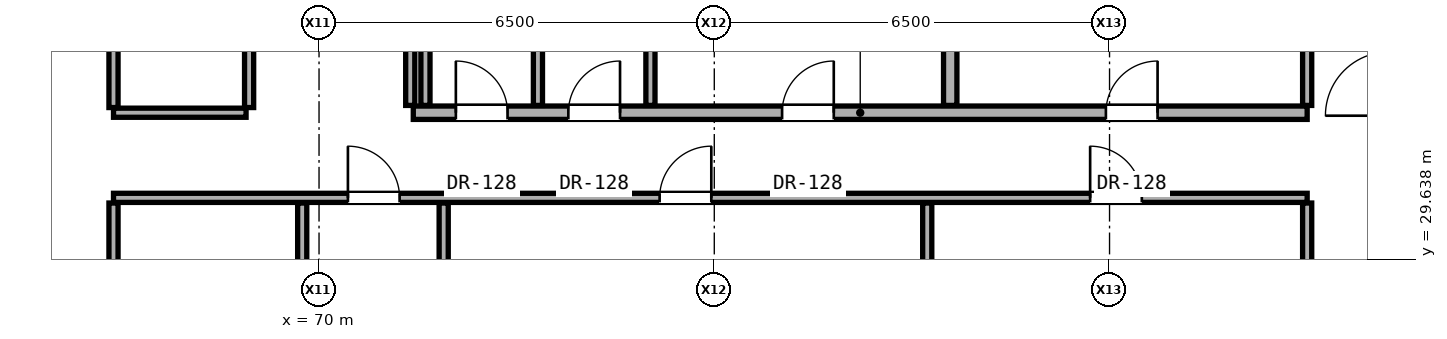
"""IFC4 building model, lengths in metres.
Left out: names, types, materials, properties, quantities, classifications, styles, units other than length and angle.
Written with IfcOpenShell. Run it as: python <this file> out.ifc"""

import sys

from ifc_helpers import new_model, si_unit, direction, frame, frame_2d, origin, place, context, subcontext, project, spatial, rectangle, extrude, element, fill, save


model = new_model("IFC4")
c1 = context("Model", 3, precision=1e-05, world=origin(), true_north=direction((0.0, 1.0)))
c2 = subcontext(c1, "Body", "Model", "MODEL_VIEW")
j1 = project(units=[si_unit("LENGTHUNIT", "METRE"), si_unit("PLANEANGLEUNIT", "RADIAN")], contexts=[c1])
p1 = place(None, origin())
s1 = spatial("IfcSite", under=j1, at=p1, CompositionType="ELEMENT")
p2 = place(p1, origin())
s2 = spatial("IfcBuilding", under=s1, at=p2, CompositionType="ELEMENT")
p3 = place(p2, frame((0.0, 0.0, 65.3)))
s3 = spatial("IfcBuildingStorey", under=s2, at=p3, CompositionType="ELEMENT", Elevation=65.3)
p4 = place(p3, frame((66.62, 30.65, 0.0), z_axis=(0.0, 0.0, 1.0), x_axis=(1.0, 0.0, 0.0)))
e1 = element("IfcWall", 1, at=p4, inside=s3, PredefinedType="PARTITIONING", context=c2, shape_type="SweptSolid", body=[
    extrude(rectangle(XDim=19.63, YDim=0.15, at=frame_2d((9.815, 0.0))), origin(), (0.0, 0.0, 1.0), 2.125),
])
p5 = place(p4, frame((3.855, 0.0, 0.0)))
e2 = element("IfcOpeningElement", 2, at=p5, cuts=e1, PredefinedType="OPENING", context=c2, shape_type="SweptSolid", body=[
    extrude(rectangle(XDim=0.85, YDim=2.01, at=frame_2d((0.425, 1.005))), frame((0.0, 0.085, 0.0), z_axis=(0.0, -1.0, 0.0), x_axis=(1.0, 0.0, 0.0)), (0.0, 0.0, 1.0), 0.17),
])
p6 = place(p4, frame((8.981, 0.0, 0.0)))
e3 = element("IfcOpeningElement", 3, at=p6, cuts=e1, PredefinedType="OPENING", context=c2, shape_type="SweptSolid", body=[
    extrude(rectangle(XDim=0.85, YDim=2.01, at=frame_2d((0.425, 1.005))), frame((0.0, 0.085, 0.0), z_axis=(0.0, -1.0, 0.0), x_axis=(1.0, 0.0, 0.0)), (0.0, 0.0, 1.0), 0.17),
])
p7 = place(p4, frame((16.061, 0.0, 0.0)))
e4 = element("IfcOpeningElement", 4, at=p7, cuts=e1, PredefinedType="OPENING", context=c2, shape_type="SweptSolid", body=[
    extrude(rectangle(XDim=0.85, YDim=2.01, at=frame_2d((0.425, 1.005))), frame((0.0, 0.085, 0.0), z_axis=(0.0, -1.0, 0.0), x_axis=(1.0, 0.0, 0.0)), (0.0, 0.0, 1.0), 0.17),
])
p8 = place(p3, frame((66.62, 32.05, 0.0), z_axis=(0.0, 0.0, 1.0), x_axis=(1.0, 0.0, 0.0)))
e5 = element("IfcWall", 5, at=p8, inside=s3, PredefinedType="PARTITIONING", context=c2, shape_type="SweptSolid", body=[
    extrude(rectangle(XDim=2.18, YDim=0.15, at=frame_2d((1.09, 0.0))), origin(), (0.0, 0.0, 1.0), 2.125),
])
p9 = place(p3, frame((71.55, 32.05, 0.0), z_axis=(0.0, 0.0, 1.0), x_axis=(1.0, 0.0, 0.0)))
e6 = element("IfcWall", 6, at=p9, inside=s3, PredefinedType="SOLIDWALL", context=c2, shape_type="SweptSolid", body=[
    extrude(rectangle(XDim=14.7, YDim=0.22, at=frame_2d((7.35, 0.0))), origin(), (0.0, 0.0, 1.0), 2.125),
])
p10 = place(p9, frame((11.39, 0.0, 0.0)))
e7 = element("IfcOpeningElement", 7, at=p10, cuts=e6, PredefinedType="OPENING", context=c2, shape_type="SweptSolid", body=[
    extrude(rectangle(XDim=0.85, YDim=2.01, at=frame_2d((0.425, 1.005))), frame((0.0, 0.12, 0.0), z_axis=(0.0, -1.0, 0.0), x_axis=(1.0, 0.0, 0.0)), (0.0, 0.0, 1.0), 0.24),
])
p11 = place(p9, frame((6.065, 0.0, 0.0)))
e8 = element("IfcOpeningElement", 8, at=p11, cuts=e6, PredefinedType="OPENING", context=c2, shape_type="SweptSolid", body=[
    extrude(rectangle(XDim=0.85, YDim=2.01, at=frame_2d((0.425, 1.005))), frame((0.0, 0.12, 0.0), z_axis=(0.0, -1.0, 0.0), x_axis=(1.0, 0.0, 0.0)), (0.0, 0.0, 1.0), 0.24),
])
p12 = place(p9, frame((0.7, 0.0, 0.0)))
e9 = element("IfcOpeningElement", 9, at=p12, cuts=e6, PredefinedType="OPENING", context=c2, shape_type="SweptSolid", body=[
    extrude(rectangle(XDim=0.85, YDim=2.01, at=frame_2d((0.425, 1.005))), frame((0.0, 0.12, 0.0), z_axis=(0.0, -1.0, 0.0), x_axis=(1.0, 0.0, 0.0)), (0.0, 0.0, 1.0), 0.24),
])
p13 = place(p9, frame((2.55, 0.0, 0.0)))
e10 = element("IfcOpeningElement", 10, at=p13, cuts=e6, PredefinedType="OPENING", context=c2, shape_type="SweptSolid", body=[
    extrude(rectangle(XDim=0.85, YDim=2.01, at=frame_2d((0.425, 1.005))), frame((0.0, 0.12, 0.0), z_axis=(0.0, -1.0, 0.0), x_axis=(1.0, 0.0, 0.0)), (0.0, 0.0, 1.0), 0.24),
])
p14 = place(p3, frame((66.62, 24.935, 0.0), z_axis=(0.0, 0.0, 1.0), x_axis=(0.0, 1.0, 0.0)))
e11 = element("IfcWall", 11, at=p14, inside=s3, PredefinedType="PARTITIONING", context=c2, shape_type="SweptSolid", body=[
    extrude(rectangle(XDim=5.63, YDim=0.15, at=frame_2d((2.815, 0.0))), origin(), (0.0, 0.0, 1.0), 2.279),
])
p15 = place(p14, frame((2.34, 0.0, 0.0)))
e12 = element("IfcOpeningElement", 12, at=p15, cuts=e11, PredefinedType="OPENING", context=c2, shape_type="SweptSolid", body=[
    extrude(rectangle(XDim=0.95, YDim=2.15, at=frame_2d((0.475, 1.075))), frame((0.0, 0.085, 0.0), z_axis=(0.0, -1.0, 0.0), x_axis=(1.0, 0.0, 0.0)), (0.0, 0.0, 1.0), 0.17),
])
p16 = place(p3, frame((66.62, 32.135, 0.0), z_axis=(0.0, 0.0, 1.0), x_axis=(0.0, 1.0, 0.0)))
e13 = element("IfcWall", 13, at=p16, inside=s3, PredefinedType="PARTITIONING", context=c2, shape_type="SweptSolid", body=[
    extrude(rectangle(XDim=3.48, YDim=0.15, at=frame_2d((1.74, 0.0))), origin(), (0.0, 0.0, 1.0), 2.452),
])
p17 = place(p3, frame((68.85, 32.135, 0.0), z_axis=(0.0, 0.0, 1.0), x_axis=(0.0, 1.0, 0.0)))
e14 = element("IfcWall", 14, at=p17, inside=s3, PredefinedType="PARTITIONING", context=c2, shape_type="SweptSolid", body=[
    extrude(rectangle(XDim=2.745, YDim=0.15, at=frame_2d((1.373, 0.0))), origin(), (0.0, 0.0, 1.0), 3.06),
])
p18 = place(p3, frame((69.723, 24.935, 0.0), z_axis=(0.0, 0.0, 1.0), x_axis=(0.0, 1.0, 0.0)))
e15 = element("IfcWall", 15, at=p18, inside=s3, PredefinedType="PARTITIONING", context=c2, shape_type="SweptSolid", body=[
    extrude(rectangle(XDim=5.63, YDim=0.15, at=frame_2d((2.815, 0.0))), origin(), (0.0, 0.0, 1.0), 2.125),
])
for number, where, z_axis, x_axis in (
    (16, (71.5, 32.17, 0.0), (0.0, 0.0, 1.0), (0.0, 1.0, 0.0)),
    (17, (71.75, 32.17, 0.0), (0.0, 0.0, 1.0), (0.0, 1.0, 0.0)),
):
    element("IfcWall", number, at=place(p3, frame(where, z_axis=z_axis, x_axis=x_axis)), inside=s3, PredefinedType="PARTITIONING", context=c2, shape_type="SweptSolid", body=[
        extrude(rectangle(XDim=2.71, YDim=0.15, at=frame_2d((1.355, 0.0))), origin(), (0.0, 0.0, 1.0), 3.06),
    ])
p19 = place(p3, frame((72.05, 26.17, 0.0), z_axis=(0.0, 0.0, 1.0), x_axis=(0.0, 1.0, 0.0)))
e18 = element("IfcWall", 18, at=p19, inside=s3, PredefinedType="PARTITIONING", context=c2, shape_type="SweptSolid", body=[
    extrude(rectangle(XDim=4.395, YDim=0.15, at=frame_2d((2.198, 0.0))), origin(), (0.0, 0.0, 1.0), 2.125),
])
for number, where, z_axis, x_axis in (
    (19, (73.6, 32.17, 0.0), (0.0, 0.0, 1.0), (0.0, 1.0, 0.0)),
    (20, (75.45, 32.17, 0.0), (0.0, 0.0, 1.0), (0.0, 1.0, 0.0)),
):
    element("IfcWall", number, at=place(p3, frame(where, z_axis=z_axis, x_axis=x_axis)), inside=s3, PredefinedType="PARTITIONING", context=c2, shape_type="SweptSolid", body=[
        extrude(rectangle(XDim=2.71, YDim=0.15, at=frame_2d((1.355, 0.0))), origin(), (0.0, 0.0, 1.0), 3.06),
    ])
p20 = place(p3, frame((80.002, 26.17, 0.0), z_axis=(0.0, 0.0, 1.0), x_axis=(0.0, 1.0, 0.0)))
e21 = element("IfcWall", 21, at=p20, inside=s3, PredefinedType="PARTITIONING", context=c2, shape_type="SweptSolid", body=[
    extrude(rectangle(XDim=4.395, YDim=0.15, at=frame_2d((2.198, 0.0))), origin(), (0.0, 0.0, 1.0), 2.125),
])
p21 = place(p3, frame((80.38, 32.17, 0.0), z_axis=(0.0, 0.0, 1.0), x_axis=(0.0, 1.0, 0.0)))
e22 = element("IfcWall", 22, at=p21, inside=s3, PredefinedType="SOLIDWALL", context=c2, shape_type="SweptSolid", body=[
    extrude(rectangle(XDim=2.71, YDim=0.22, at=frame_2d((1.355, 0.0))), origin(), (0.0, 0.0, 1.0), 3.06),
])
p22 = place(p3, frame((86.25, 26.17, 0.0), z_axis=(0.0, 0.0, 1.0), x_axis=(0.0, 1.0, 0.0)))
e23 = element("IfcWall", 23, at=p22, inside=s3, PredefinedType="PARTITIONING", context=c2, shape_type="SweptSolid", body=[
    extrude(rectangle(XDim=4.395, YDim=0.15, at=frame_2d((2.198, 0.0))), origin(), (0.0, 0.0, 1.0), 2.279),
])
p23 = place(p3, frame((86.25, 32.17, 0.0), z_axis=(0.0, 0.0, 1.0), x_axis=(0.0, 1.0, 0.0)))
e24 = element("IfcWall", 24, at=p23, inside=s3, PredefinedType="PARTITIONING", context=c2, shape_type="SweptSolid", body=[
    extrude(rectangle(XDim=2.795, YDim=0.15, at=frame_2d((1.397, 0.0))), origin(), (0.0, 0.0, 1.0), 2.452),
])
p24 = place(p10, origin())
e25 = element("IfcDoor", 25, at=p24, inside=s3, OperationType="SINGLE_SWING_RIGHT", PredefinedType="DOOR", context=c2, shape_type="SweptSolid", body=[
    extrude(rectangle(XDim=0.85, YDim=2.01, at=frame_2d((0.425, 1.005))), frame((0.0, 0.025, 0.0), z_axis=(0.0, -1.0, 0.0), x_axis=(1.0, 0.0, 0.0)), (0.0, 0.0, 1.0), 0.05),
])
fill(e7, e25)
p25 = place(p11, origin())
e26 = element("IfcDoor", 26, at=p25, inside=s3, OperationType="SINGLE_SWING_RIGHT", PredefinedType="DOOR", context=c2, shape_type="SweptSolid", body=[
    extrude(rectangle(XDim=0.85, YDim=2.01, at=frame_2d((0.425, 1.005))), frame((0.0, 0.025, 0.0), z_axis=(0.0, -1.0, 0.0), x_axis=(1.0, 0.0, 0.0)), (0.0, 0.0, 1.0), 0.05),
])
fill(e8, e26)
p26 = place(p12, origin())
e27 = element("IfcDoor", 27, at=p26, inside=s3, OperationType="SINGLE_SWING_LEFT", PredefinedType="DOOR", context=c2, shape_type="SweptSolid", body=[
    extrude(rectangle(XDim=0.85, YDim=2.01, at=frame_2d((0.425, 1.005))), frame((0.0, 0.025, 0.0), z_axis=(0.0, -1.0, 0.0), x_axis=(1.0, 0.0, 0.0)), (0.0, 0.0, 1.0), 0.05),
])
fill(e9, e27)
p27 = place(p13, origin())
e28 = element("IfcDoor", 28, at=p27, inside=s3, OperationType="SINGLE_SWING_RIGHT", PredefinedType="DOOR", context=c2, shape_type="SweptSolid", body=[
    extrude(rectangle(XDim=0.85, YDim=2.01, at=frame_2d((0.425, 1.005))), frame((0.0, 0.025, 0.0), z_axis=(0.0, -1.0, 0.0), x_axis=(1.0, 0.0, 0.0)), (0.0, 0.0, 1.0), 0.05),
])
fill(e10, e28)
p28 = place(p5, origin())
e29 = element("IfcDoor", 29, at=p28, inside=s3, OperationType="SINGLE_SWING_LEFT", PredefinedType="DOOR", context=c2, shape_type="SweptSolid", body=[
    extrude(rectangle(XDim=0.85, YDim=2.01, at=frame_2d((0.425, 1.005))), frame((0.0, 0.025, 0.0), z_axis=(0.0, -1.0, 0.0), x_axis=(1.0, 0.0, 0.0)), (0.0, 0.0, 1.0), 0.05),
])
fill(e2, e29)
p29 = place(p6, origin())
e30 = element("IfcDoor", 30, at=p29, inside=s3, OperationType="SINGLE_SWING_RIGHT", PredefinedType="DOOR", context=c2, shape_type="SweptSolid", body=[
    extrude(rectangle(XDim=0.85, YDim=2.01, at=frame_2d((0.425, 1.005))), frame((0.0, 0.025, 0.0), z_axis=(0.0, -1.0, 0.0), x_axis=(1.0, 0.0, 0.0)), (0.0, 0.0, 1.0), 0.05),
])
fill(e3, e30)
p30 = place(p7, origin())
e31 = element("IfcDoor", 31, at=p30, inside=s3, OperationType="SINGLE_SWING_LEFT", PredefinedType="DOOR", context=c2, shape_type="SweptSolid", body=[
    extrude(rectangle(XDim=0.85, YDim=2.01, at=frame_2d((0.425, 1.005))), frame((0.0, 0.025, 0.0), z_axis=(0.0, -1.0, 0.0), x_axis=(1.0, 0.0, 0.0)), (0.0, 0.0, 1.0), 0.05),
])
fill(e4, e31)
save(model, sys.argv[1])
